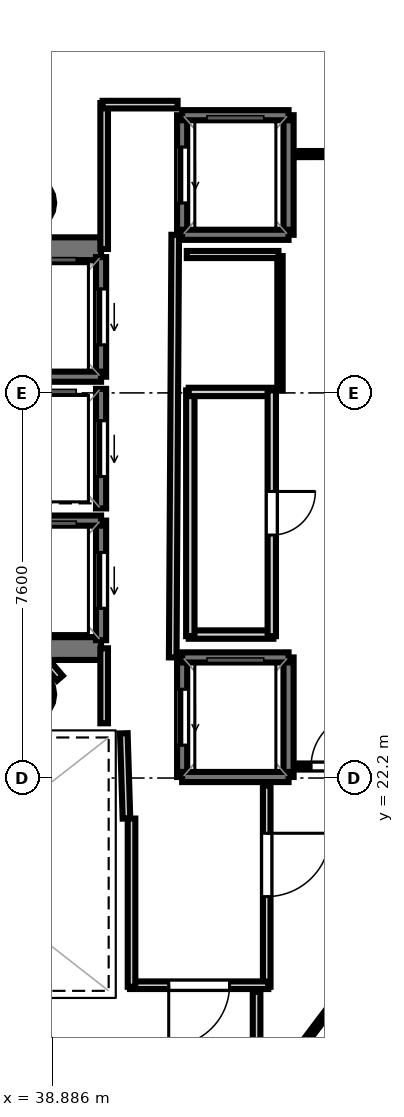
"""IFC4 building model, lengths in metres.
Left out: names, types, materials, properties, quantities, classifications, styles, units other than length and angle.
Written with IfcOpenShell. Run it as: python <this file> out.ifc"""

import sys

from ifc_helpers import new_model, si_unit, direction, frame, frame_2d, origin, origin_2d, place, context, subcontext, project, spatial, rectangle, hollow_circle, extrude, element, fill, save


model = new_model("IFC4")
c1 = context("Model", 3, precision=1e-05, world=origin(), true_north=direction((0.0, 1.0)))
c2 = subcontext(c1, "Body", "Model", "MODEL_VIEW")
j1 = project(units=[si_unit("LENGTHUNIT", "METRE"), si_unit("PLANEANGLEUNIT", "RADIAN")], contexts=[c1])
p1 = place(None, origin())
s1 = spatial("IfcSite", under=j1, at=p1, CompositionType="ELEMENT")
p2 = place(p1, origin())
s2 = spatial("IfcBuilding", under=s1, at=p2, CompositionType="ELEMENT")
p3 = place(p2, frame((0.0, 0.0, 268.6)))
s3 = spatial("IfcBuildingStorey", under=s2, at=p3, CompositionType="ELEMENT", Elevation=268.6)
p4 = place(p3, frame((29.33, 32.645, 0.0), z_axis=(0.0, 0.0, 1.0), x_axis=(1.0, 0.0, 0.0)))
e1 = element("IfcWall", 1, at=p4, inside=s3, PredefinedType="SHEAR", context=c2, shape_type="SweptSolid", body=[
    extrude(rectangle(XDim=10.52, YDim=0.45, at=frame_2d((5.26, 0.0))), origin(), (0.0, 0.0, 1.0), 3.52),
])
p5 = place(p4, frame((0.895, 0.0, 0.0)))
e2 = element("IfcOpeningElement", 2, at=p5, cuts=e1, PredefinedType="OPENING", context=c2, shape_type="SweptSolid", body=[
    extrude(rectangle(XDim=1.25, YDim=2.15, at=frame_2d((0.625, 1.075))), frame((0.0, 0.235, 0.0), z_axis=(0.0, -1.0, 0.0), x_axis=(1.0, 0.0, 0.0)), (0.0, 0.0, 1.0), 0.47),
])
p6 = place(p3, frame((29.33, 24.755, 0.0), z_axis=(0.0, 0.0, 1.0), x_axis=(1.0, 0.0, 0.0)))
e3 = element("IfcWall", 3, at=p6, inside=s3, PredefinedType="SHEAR", context=c2, shape_type="SweptSolid", body=[
    extrude(rectangle(XDim=10.52, YDim=0.45, at=frame_2d((5.26, 0.0))), origin(), (0.0, 0.0, 1.0), 3.52),
])
p7 = place(p6, frame((0.695, 0.0, 0.0)))
e4 = element("IfcOpeningElement", 4, at=p7, cuts=e3, PredefinedType="OPENING", context=c2, shape_type="SweptSolid", body=[
    extrude(rectangle(XDim=1.25, YDim=2.15, at=frame_2d((0.625, 1.075))), frame((0.0, 0.235, 0.0), z_axis=(0.0, -1.0, 0.0), x_axis=(1.0, 0.0, 0.0)), (0.0, 0.0, 1.0), 0.47),
])
for number, where, z_axis, x_axis in (
    (5, (38.4, 33.55, 0.0), (0.0, 0.0, 1.0), (1.0, 0.0, 0.0)),
    (6, (38.4, 23.85, 0.0), (0.0, 0.0, 1.0), (1.0, 0.0, 0.0)),
):
    element("IfcColumn", number, at=place(p3, frame(where, z_axis=z_axis, x_axis=x_axis)), inside=s3, PredefinedType="COLUMN", context=c2, shape_type="SweptSolid", body=[
        extrude(hollow_circle(Radius=0.525, WallThickness=0.028, at=origin_2d()), origin(), (0.0, 0.0, 1.0), 3.7),
    ])
p8 = place(p3, frame((39.85, 30.12, 0.0), z_axis=(0.0, 0.0, 1.0), x_axis=(0.0, 1.0, 0.0)))
e7 = element("IfcWall", 7, at=p8, inside=s3, PredefinedType="SOLIDWALL", context=c2, shape_type="SweptSolid", body=[
    extrude(rectangle(XDim=2.36, YDim=0.2, at=frame_2d((1.18, 0.0))), origin(), (0.0, 0.0, 1.0), 3.52),
])
p9 = place(p8, frame((0.63, 0.0, 0.0)))
e8 = element("IfcOpeningElement", 8, at=p9, cuts=e7, PredefinedType="OPENING", context=c2, shape_type="SweptSolid", body=[
    extrude(rectangle(XDim=1.1, YDim=2.15, at=frame_2d((0.55, 1.075))), frame((0.0, 0.11, 0.0), z_axis=(0.0, -1.0, 0.0), x_axis=(1.0, 0.0, 0.0)), (0.0, 0.0, 1.0), 0.22),
])
p10 = place(p3, frame((37.75, 30.12, 0.0), z_axis=(0.0, 0.0, 1.0), x_axis=(1.0, 0.0, 0.0)))
e9 = element("IfcWall", 9, at=p10, inside=s3, PredefinedType="SOLIDWALL", context=c2, shape_type="SweptSolid", body=[
    extrude(rectangle(XDim=2.1, YDim=0.2, at=frame_2d((1.05, 0.0))), origin(), (0.0, 0.0, 1.0), 3.52),
])
p11 = place(p3, frame((39.85, 24.92, 0.0), z_axis=(0.0, 0.0, 1.0), x_axis=(0.0, 1.0, 0.0)))
e10 = element("IfcWall", 10, at=p11, inside=s3, PredefinedType="SOLIDWALL", context=c2, shape_type="SweptSolid", body=[
    extrude(rectangle(XDim=2.36, YDim=0.2, at=frame_2d((1.18, 0.0))), origin(), (0.0, 0.0, 1.0), 3.52),
])
p12 = place(p11, frame((0.63, 0.0, 0.0)))
e11 = element("IfcOpeningElement", 11, at=p12, cuts=e10, PredefinedType="OPENING", context=c2, shape_type="SweptSolid", body=[
    extrude(rectangle(XDim=1.1, YDim=2.15, at=frame_2d((0.55, 1.075))), frame((0.0, 0.11, 0.0), z_axis=(0.0, -1.0, 0.0), x_axis=(1.0, 0.0, 0.0)), (0.0, 0.0, 1.0), 0.22),
])
p13 = place(p3, frame((37.75, 27.28, 0.0), z_axis=(0.0, 0.0, 1.0), x_axis=(1.0, 0.0, 0.0)))
e12 = element("IfcWall", 12, at=p13, inside=s3, PredefinedType="SOLIDWALL", context=c2, shape_type="SweptSolid", body=[
    extrude(rectangle(XDim=2.1, YDim=0.2, at=frame_2d((1.05, 0.0))), origin(), (0.0, 0.0, 1.0), 3.52),
])
p14 = place(p3, frame((39.85, 27.52, 0.0), z_axis=(0.0, 0.0, 1.0), x_axis=(0.0, 1.0, 0.0)))
e13 = element("IfcWall", 13, at=p14, inside=s3, PredefinedType="SOLIDWALL", context=c2, shape_type="SweptSolid", body=[
    extrude(rectangle(XDim=2.36, YDim=0.2, at=frame_2d((1.18, 0.0))), origin(), (0.0, 0.0, 1.0), 3.52),
])
p15 = place(p14, frame((0.63, 0.0, 0.0)))
e14 = element("IfcOpeningElement", 14, at=p15, cuts=e13, PredefinedType="OPENING", context=c2, shape_type="SweptSolid", body=[
    extrude(rectangle(XDim=1.1, YDim=2.15, at=frame_2d((0.55, 1.075))), frame((0.0, 0.11, 0.0), z_axis=(0.0, -1.0, 0.0), x_axis=(1.0, 0.0, 0.0)), (0.0, 0.0, 1.0), 0.22),
])
p16 = place(p3, frame((43.55, 22.22, 0.0), z_axis=(0.0, 0.0, 1.0), x_axis=(0.0, 1.0, 0.0)))
e15 = element("IfcWall", 15, at=p16, inside=s3, PredefinedType="SOLIDWALL", context=c2, shape_type="SweptSolid", body=[
    extrude(rectangle(XDim=2.36, YDim=0.2, at=frame_2d((1.18, 0.0))), origin(), (0.0, 0.0, 1.0), 3.52),
])
p17 = place(p3, frame((41.45, 22.22, 0.0), z_axis=(0.0, 0.0, 1.0), x_axis=(0.0, 1.0, 0.0)))
e16 = element("IfcWall", 16, at=p17, inside=s3, PredefinedType="SOLIDWALL", context=c2, shape_type="SweptSolid", body=[
    extrude(rectangle(XDim=2.36, YDim=0.2, at=frame_2d((1.18, 0.0))), origin(), (0.0, 0.0, 1.0), 3.52),
])
p18 = place(p17, frame((0.63, 0.0, 0.0)))
e17 = element("IfcOpeningElement", 17, at=p18, cuts=e16, PredefinedType="OPENING", context=c2, shape_type="SweptSolid", body=[
    extrude(rectangle(XDim=1.1, YDim=2.15, at=frame_2d((0.55, 1.075))), frame((0.0, 0.11, 0.0), z_axis=(0.0, -1.0, 0.0), x_axis=(1.0, 0.0, 0.0)), (0.0, 0.0, 1.0), 0.22),
])
for number, where, z_axis, x_axis in (
    (18, (41.45, 24.58, 0.0), (0.0, 0.0, 1.0), (1.0, 0.0, 0.0)),
    (19, (41.45, 22.22, 0.0), (0.0, 0.0, 1.0), (1.0, 0.0, 0.0)),
):
    element("IfcWall", number, at=place(p3, frame(where, z_axis=z_axis, x_axis=x_axis)), inside=s3, PredefinedType="SOLIDWALL", context=c2, shape_type="SweptSolid", body=[
        extrude(rectangle(XDim=2.1, YDim=0.2, at=frame_2d((1.05, 0.0))), origin(), (0.0, 0.0, 1.0), 3.52),
    ])
p19 = place(p3, frame((43.55, 32.92, 0.0), z_axis=(0.0, 0.0, 1.0), x_axis=(0.0, 1.0, 0.0)))
e20 = element("IfcWall", 20, at=p19, inside=s3, PredefinedType="SOLIDWALL", context=c2, shape_type="SweptSolid", body=[
    extrude(rectangle(XDim=2.36, YDim=0.2, at=frame_2d((1.18, 0.0))), origin(), (0.0, 0.0, 1.0), 3.52),
])
p20 = place(p3, frame((41.45, 32.92, 0.0), z_axis=(0.0, 0.0, 1.0), x_axis=(0.0, 1.0, 0.0)))
e21 = element("IfcWall", 21, at=p20, inside=s3, PredefinedType="SOLIDWALL", context=c2, shape_type="SweptSolid", body=[
    extrude(rectangle(XDim=2.36, YDim=0.2, at=frame_2d((1.18, 0.0))), origin(), (0.0, 0.0, 1.0), 3.52),
])
p21 = place(p20, frame((0.63, 0.0, 0.0)))
e22 = element("IfcOpeningElement", 22, at=p21, cuts=e21, PredefinedType="OPENING", context=c2, shape_type="SweptSolid", body=[
    extrude(rectangle(XDim=1.1, YDim=2.15, at=frame_2d((0.55, 1.075))), frame((0.0, 0.11, 0.0), z_axis=(0.0, -1.0, 0.0), x_axis=(1.0, 0.0, 0.0)), (0.0, 0.0, 1.0), 0.22),
])
for number, where, z_axis, x_axis in (
    (23, (41.45, 35.28, 0.0), (0.0, 0.0, 1.0), (1.0, 0.0, 0.0)),
    (24, (41.45, 32.92, 0.0), (0.0, 0.0, 1.0), (1.0, 0.0, 0.0)),
):
    element("IfcWall", number, at=place(p3, frame(where, z_axis=z_axis, x_axis=x_axis)), inside=s3, PredefinedType="SOLIDWALL", context=c2, shape_type="SweptSolid", body=[
        extrude(rectangle(XDim=2.1, YDim=0.2, at=frame_2d((1.05, 0.0))), origin(), (0.0, 0.0, 1.0), 3.52),
    ])
p22 = place(p3, frame((40.351, 21.401, 0.0), z_axis=(0.0, 0.0, 1.0), x_axis=(-0.031058045979, 0.999517582527, 0.0)))
e25 = element("IfcWall", 25, at=p22, inside=s3, PredefinedType="PARTITIONING", context=c2, shape_type="SweptSolid", body=[
    extrude(rectangle(XDim=1.682, YDim=0.15, at=frame_2d((0.841, 0.0))), origin(), (0.0, 0.0, 1.0), 2.84),
])
p23 = place(p3, frame((39.911, 23.28, 0.0), z_axis=(0.0, 0.0, 1.0), x_axis=(0.0, 1.0, 0.0)))
e26 = element("IfcWall", 26, at=p23, inside=s3, PredefinedType="PARTITIONING", context=c2, shape_type="SweptSolid", body=[
    extrude(rectangle(XDim=1.48, YDim=0.15, at=frame_2d((0.74, 0.0))), origin(), (0.0, 0.0, 1.0), 2.84),
])
p24 = place(p3, frame((39.911, 32.64, 0.0), z_axis=(0.0, 0.0, 1.0), x_axis=(0.0, 1.0, 0.0)))
e27 = element("IfcWall", 27, at=p24, inside=s3, PredefinedType="PARTITIONING", context=c2, shape_type="SweptSolid", body=[
    extrude(rectangle(XDim=2.88, YDim=0.15, at=frame_2d((1.44, 0.0))), origin(), (0.0, 0.0, 1.0), 2.84),
])
p25 = place(p3, frame((39.88, 35.489, 0.0), z_axis=(0.0, 0.0, 1.0), x_axis=(1.0, 0.0, 0.0)))
e28 = element("IfcWall", 28, at=p25, inside=s3, PredefinedType="PARTITIONING", context=c2, shape_type="SweptSolid", body=[
    extrude(rectangle(XDim=1.48, YDim=0.15, at=frame_2d((0.74, 0.0))), origin(), (0.0, 0.0, 1.0), 2.84),
])
p26 = place(p3, frame((41.313, 32.92, 0.0), z_axis=(0.0, 0.0, 1.0), x_axis=(-0.005942518022, -0.999982343084, 0.0)))
e29 = element("IfcWall", 29, at=p26, inside=s3, PredefinedType="PARTITIONING", context=c2, shape_type="SweptSolid", body=[
    extrude(rectangle(XDim=8.34, YDim=0.15, at=frame_2d((4.17, 0.0))), origin(), (0.0, 0.0, 1.0), 2.84),
])
p27 = place(p3, frame((43.119, 22.05, 0.0), z_axis=(0.0, 0.0, 1.0), x_axis=(0.0, -1.0, 0.0)))
e30 = element("IfcWall", 30, at=p27, inside=s3, PredefinedType="PARTITIONING", context=c2, shape_type="SweptSolid", body=[
    extrude(rectangle(XDim=3.97, YDim=0.15, at=frame_2d((1.985, 0.0))), origin(), (0.0, 0.0, 1.0), 2.84),
])
p28 = place(p27, frame((0.94, 0.0, 0.0)))
e31 = element("IfcOpeningElement", 31, at=p28, cuts=e30, PredefinedType="OPENING", context=c2, shape_type="SweptSolid", body=[
    extrude(rectangle(XDim=1.25, YDim=2.2, at=frame_2d((0.625, 1.1))), frame((0.0, 0.085, 0.0), z_axis=(0.0, -1.0, 0.0), x_axis=(1.0, 0.0, 0.0)), (0.0, 0.0, 1.0), 0.17),
])
p29 = place(p3, frame((43.15, 18.111, 0.0), z_axis=(0.0, 0.0, 1.0), x_axis=(-1.0, 0.0, 0.0)))
e32 = element("IfcWall", 32, at=p29, inside=s3, PredefinedType="PARTITIONING", context=c2, shape_type="SweptSolid", body=[
    extrude(rectangle(XDim=2.73, YDim=0.15, at=frame_2d((1.365, 0.0))), origin(), (0.0, 0.0, 1.0), 2.84),
])
p30 = place(p29, frame((0.765, 0.0, 0.0)))
e33 = element("IfcOpeningElement", 33, at=p30, cuts=e32, PredefinedType="OPENING", context=c2, shape_type="SweptSolid", body=[
    extrude(rectangle(XDim=1.2, YDim=2.15, at=frame_2d((0.6, 1.075))), frame((0.0, 0.085, 0.0), z_axis=(0.0, -1.0, 0.0), x_axis=(1.0, 0.0, 0.0)), (0.0, 0.0, 1.0), 0.17),
])
p31 = place(p3, frame((40.451, 18.08, 0.0), z_axis=(0.0, 0.0, 1.0), x_axis=(0.0, 1.0, 0.0)))
e34 = element("IfcWall", 34, at=p31, inside=s3, PredefinedType="PARTITIONING", context=c2, shape_type="SweptSolid", body=[
    extrude(rectangle(XDim=3.32, YDim=0.15, at=frame_2d((1.66, 0.0))), origin(), (0.0, 0.0, 1.0), 2.84),
])
p32 = place(p3, frame((43.25, 25.031, 0.0), z_axis=(0.0, 0.0, 1.0), x_axis=(-1.0, 0.0, 0.0)))
e35 = element("IfcWall", 35, at=p32, inside=s3, PredefinedType="PLUMBINGWALL", context=c2, shape_type="SweptSolid", body=[
    extrude(rectangle(XDim=1.67, YDim=0.165, at=frame_2d((0.835, 0.0))), origin(), (0.0, 0.0, 1.0), 2.84),
])
p33 = place(p3, frame((41.611, 25.0, 0.0), z_axis=(0.0, 0.0, 1.0), x_axis=(0.0, 1.0, 0.0)))
e36 = element("IfcWall", 36, at=p33, inside=s3, PredefinedType="PLUMBINGWALL", context=c2, shape_type="SweptSolid", body=[
    extrude(rectangle(XDim=4.85, YDim=0.165, at=frame_2d((2.425, 0.0))), origin(), (0.0, 0.0, 1.0), 2.84),
])
p34 = place(p3, frame((41.58, 29.819, 0.0), z_axis=(0.0, 0.0, 1.0), x_axis=(1.0, 0.0, 0.0)))
e37 = element("IfcWall", 37, at=p34, inside=s3, PredefinedType="PLUMBINGWALL", context=c2, shape_type="SweptSolid", body=[
    extrude(rectangle(XDim=1.67, YDim=0.165, at=frame_2d((0.835, 0.0))), origin(), (0.0, 0.0, 1.0), 2.84),
])
p35 = place(p3, frame((43.219, 29.85, 0.0), z_axis=(0.0, 0.0, 1.0), x_axis=(0.0, -1.0, 0.0)))
e38 = element("IfcWall", 38, at=p35, inside=s3, PredefinedType="PLUMBINGWALL", context=c2, shape_type="SweptSolid", body=[
    extrude(rectangle(XDim=4.85, YDim=0.165, at=frame_2d((2.425, 0.0))), origin(), (0.0, 0.0, 1.0), 2.84),
])
p36 = place(p35, frame((1.995, 0.0, 0.0)))
e39 = element("IfcOpeningElement", 39, at=p36, cuts=e38, PredefinedType="OPENING", context=c2, shape_type="SweptSolid", body=[
    extrude(rectangle(XDim=0.86, YDim=2.05, at=frame_2d((0.43, 1.025))), frame((0.0, 0.093, 0.0), z_axis=(0.0, -1.0, 0.0), x_axis=(1.0, 0.0, 0.0)), (0.0, 0.0, 1.0), 0.185),
])
p37 = place(p3, frame((39.036, 24.17, 0.0), z_axis=(0.0, 0.0, 1.0), x_axis=(-0.652260263346, 0.757995084984, 0.0)))
e40 = element("IfcWall", 40, at=p37, inside=s3, PredefinedType="PARTITIONING", context=c2, shape_type="SweptSolid", body=[
    extrude(rectangle(XDim=0.355, YDim=0.15, at=frame_2d((0.178, 0.0))), origin(), (0.0, 0.0, 1.0), 2.84),
])
p38 = place(p3, frame((42.919, 17.98, 0.0), z_axis=(0.0, 0.0, 1.0), x_axis=(0.0, -1.0, 0.0)))
e41 = element("IfcWall", 41, at=p38, inside=s3, PredefinedType="PARTITIONING", context=c2, shape_type="SweptSolid", body=[
    extrude(rectangle(XDim=3.188, YDim=0.15, at=frame_2d((1.594, 0.0))), origin(), (0.0, 0.0, 1.0), 2.84),
])
p39 = place(p3, frame((43.72, 22.427, 0.0), z_axis=(0.0, 0.0, 1.0), x_axis=(1.0, 0.0, 0.0)))
e42 = element("IfcWall", 42, at=p39, inside=s3, PredefinedType="PARTITIONING", context=c2, shape_type="SweptSolid", body=[
    extrude(rectangle(XDim=4.959, YDim=0.12, at=frame_2d((2.479, 0.0))), origin(), (0.0, 0.0, 1.0), 2.84),
])
p40 = place(p39, frame((0.274, 0.0, 0.0)))
e43 = element("IfcOpeningElement", 43, at=p40, cuts=e42, PredefinedType="OPENING", context=c2, shape_type="SweptSolid", body=[
    extrude(rectangle(XDim=1.05, YDim=2.15, at=frame_2d((0.525, 1.075))), frame((0.0, 0.07, 0.0), z_axis=(0.0, -1.0, 0.0), x_axis=(1.0, 0.0, 0.0)), (0.0, 0.0, 1.0), 0.14),
])
p41 = place(p3, frame((46.589, 20.596, 0.0), z_axis=(0.0, 0.0, 1.0), x_axis=(-0.601917455768, -0.798558311234, 0.0)))
e44 = element("IfcWall", 44, at=p41, inside=s3, PredefinedType="PARTITIONING", context=c2, shape_type="SweptSolid", body=[
    extrude(rectangle(XDim=8.427, YDim=0.105, at=frame_2d((4.213, 0.0))), origin(), (0.0, 0.0, 1.0), 2.84),
])
p42 = place(p3, frame((57.299, 34.532, 0.0), z_axis=(0.0, 0.0, 1.0), x_axis=(-0.999998965603, -0.001438330048, 0.0)))
e45 = element("IfcWall", 45, at=p42, inside=s3, PredefinedType="PARTITIONING", context=c2, shape_type="SweptSolid", body=[
    extrude(rectangle(XDim=13.579, YDim=0.12, at=frame_2d((6.79, 0.0))), origin(), (0.0, 0.0, 1.0), 2.84),
])
p43 = place(p3, frame((43.381, 29.85, 0.0), z_axis=(0.0, 0.0, 1.0), x_axis=(0.0, 1.0, 0.0)))
e46 = element("IfcWall", 46, at=p43, inside=s3, PredefinedType="PARTITIONING", context=c2, shape_type="SweptSolid", body=[
    extrude(rectangle(XDim=2.65, YDim=0.105, at=frame_2d((1.325, 0.0))), origin(), (0.0, 0.0, 1.0), 2.84),
])
p44 = place(p3, frame((43.35, 32.531, 0.0), z_axis=(0.0, 0.0, 1.0), x_axis=(-1.0, 0.0, 0.0)))
e47 = element("IfcWall", 47, at=p44, inside=s3, PredefinedType="PARTITIONING", context=c2, shape_type="SweptSolid", body=[
    extrude(rectangle(XDim=1.808, YDim=0.14, at=frame_2d((0.904, 0.0))), origin(), (0.0, 0.0, 1.0), 2.84),
])
p45 = place(p9, origin())
e48 = element("IfcDoor", 48, at=p45, inside=s3, OperationType="SLIDING_TO_LEFT", PredefinedType="DOOR", context=c2, shape_type="SweptSolid", body=[
    extrude(rectangle(XDim=1.1, YDim=2.15, at=frame_2d((0.55, 1.075))), frame((0.0, 0.025, 0.0), z_axis=(0.0, -1.0, 0.0), x_axis=(1.0, 0.0, 0.0)), (0.0, 0.0, 1.0), 0.05),
])
fill(e8, e48)
p46 = place(p12, origin())
e49 = element("IfcDoor", 49, at=p46, inside=s3, OperationType="SLIDING_TO_LEFT", PredefinedType="DOOR", context=c2, shape_type="SweptSolid", body=[
    extrude(rectangle(XDim=1.1, YDim=2.15, at=frame_2d((0.55, 1.075))), frame((0.0, 0.025, 0.0), z_axis=(0.0, -1.0, 0.0), x_axis=(1.0, 0.0, 0.0)), (0.0, 0.0, 1.0), 0.05),
])
fill(e11, e49)
p47 = place(p15, origin())
e50 = element("IfcDoor", 50, at=p47, inside=s3, OperationType="SLIDING_TO_LEFT", PredefinedType="DOOR", context=c2, shape_type="SweptSolid", body=[
    extrude(rectangle(XDim=1.1, YDim=2.15, at=frame_2d((0.55, 1.075))), frame((0.0, 0.025, 0.0), z_axis=(0.0, -1.0, 0.0), x_axis=(1.0, 0.0, 0.0)), (0.0, 0.0, 1.0), 0.05),
])
fill(e14, e50)
p48 = place(p18, origin())
e51 = element("IfcDoor", 51, at=p48, inside=s3, OperationType="SLIDING_TO_LEFT", PredefinedType="DOOR", context=c2, shape_type="SweptSolid", body=[
    extrude(rectangle(XDim=1.1, YDim=2.15, at=frame_2d((0.55, 1.075))), frame((0.0, 0.025, 0.0), z_axis=(0.0, -1.0, 0.0), x_axis=(1.0, 0.0, 0.0)), (0.0, 0.0, 1.0), 0.05),
])
fill(e17, e51)
p49 = place(p21, origin())
e52 = element("IfcDoor", 52, at=p49, inside=s3, OperationType="SLIDING_TO_LEFT", PredefinedType="DOOR", context=c2, shape_type="SweptSolid", body=[
    extrude(rectangle(XDim=1.1, YDim=2.15, at=frame_2d((0.55, 1.075))), frame((0.0, 0.025, 0.0), z_axis=(0.0, -1.0, 0.0), x_axis=(1.0, 0.0, 0.0)), (0.0, 0.0, 1.0), 0.05),
])
fill(e22, e52)
p50 = place(p30, origin())
e53 = element("IfcDoor", 53, at=p50, inside=s3, OperationType="SINGLE_SWING_RIGHT", PredefinedType="DOOR", context=c2, shape_type="SweptSolid", body=[
    extrude(rectangle(XDim=1.2, YDim=2.15, at=frame_2d((0.6, 1.075))), frame((0.0, 0.025, 0.0), z_axis=(0.0, -1.0, 0.0), x_axis=(1.0, 0.0, 0.0)), (0.0, 0.0, 1.0), 0.05),
])
fill(e33, e53)
p51 = place(p28, origin())
e54 = element("IfcDoor", 54, at=p51, inside=s3, OperationType="SINGLE_SWING_LEFT", PredefinedType="DOOR", context=c2, shape_type="SweptSolid", body=[
    extrude(rectangle(XDim=1.25, YDim=2.2, at=frame_2d((0.625, 1.1))), frame((0.0, 0.025, 0.0), z_axis=(0.0, -1.0, 0.0), x_axis=(1.0, 0.0, 0.0)), (0.0, 0.0, 1.0), 0.05),
])
fill(e31, e54)
p52 = place(p40, origin())
e55 = element("IfcDoor", 55, at=p52, inside=s3, OperationType="SINGLE_SWING_RIGHT", PredefinedType="DOOR", context=c2, shape_type="SweptSolid", body=[
    extrude(rectangle(XDim=1.05, YDim=2.15, at=frame_2d((0.525, 1.075))), frame((0.0, 0.025, 0.0), z_axis=(0.0, -1.0, 0.0), x_axis=(1.0, 0.0, 0.0)), (0.0, 0.0, 1.0), 0.05),
])
fill(e43, e55)
p53 = place(p36, origin())
e56 = element("IfcDoor", 56, at=p53, inside=s3, OperationType="SINGLE_SWING_LEFT", PredefinedType="DOOR", context=c2, shape_type="SweptSolid", body=[
    extrude(rectangle(XDim=0.86, YDim=2.05, at=frame_2d((0.43, 1.025))), frame((0.0, 0.025, 0.0), z_axis=(0.0, -1.0, 0.0), x_axis=(1.0, 0.0, 0.0)), (0.0, 0.0, 1.0), 0.05),
])
fill(e39, e56)
save(model, sys.argv[1])
